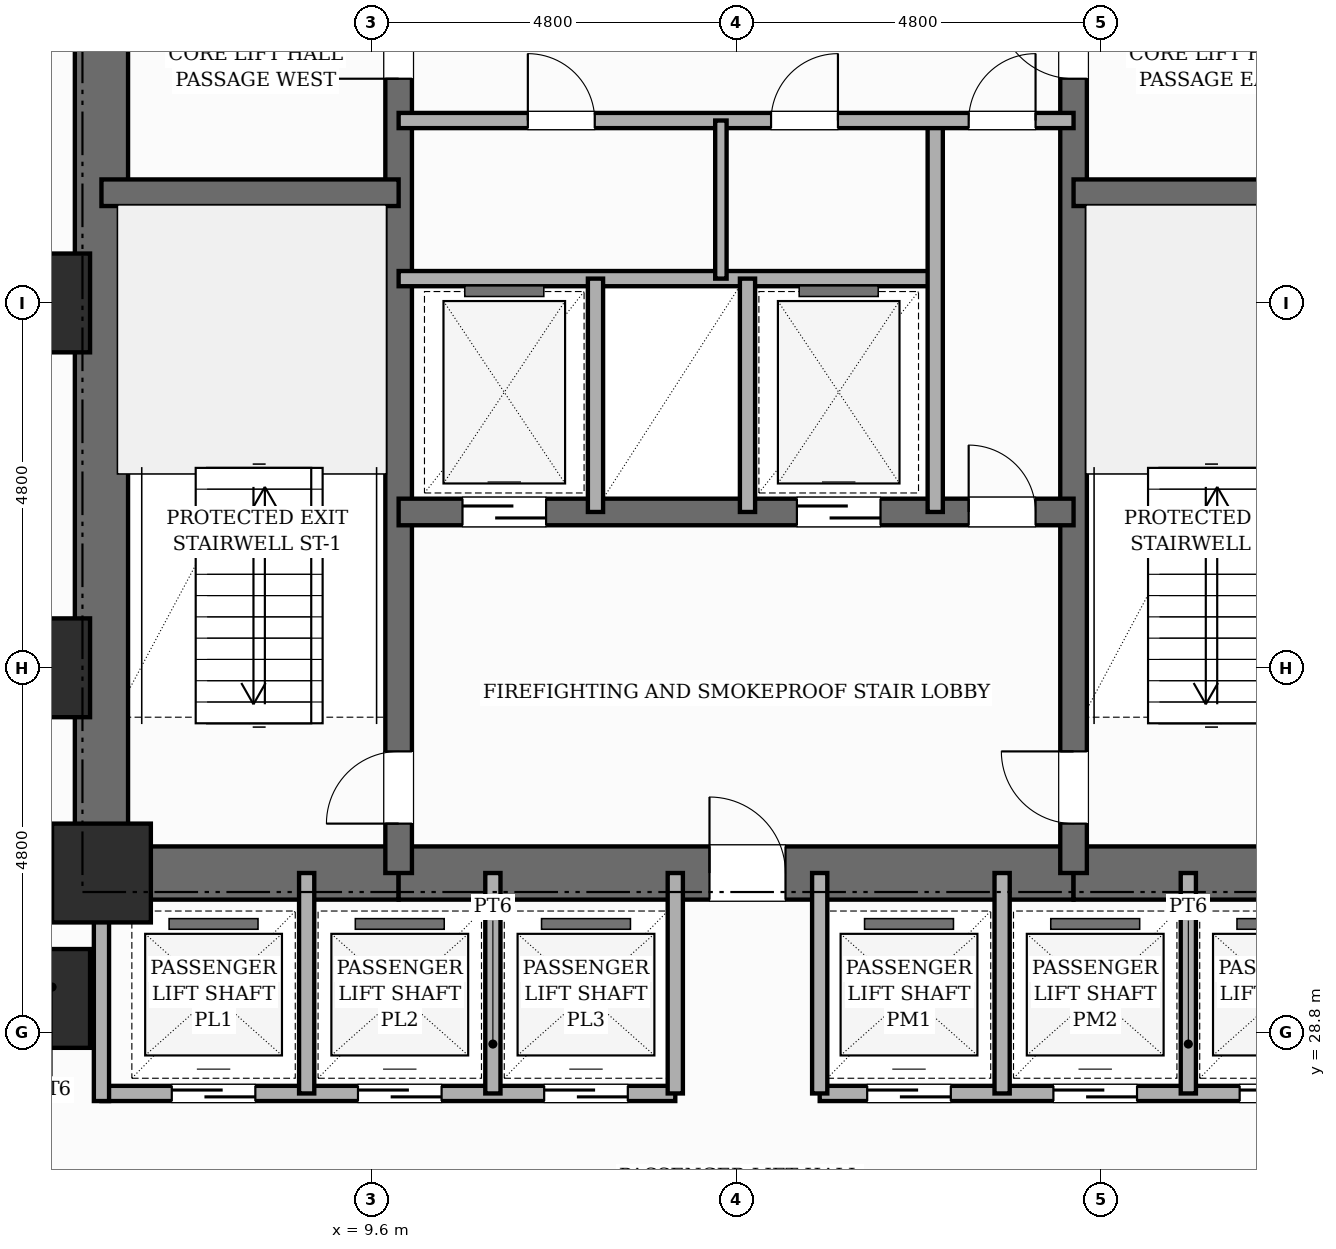
"""IFC4 building model, lengths in metres.
Left out: names, types, materials, properties, quantities, classifications, styles, units other than length and angle.
Written with IfcOpenShell. Run it as: python <this file> out.ifc"""

import sys

from ifc_helpers import new_model, si_unit, direction, frame, frame_2d, origin, origin_2d, place, context, subcontext, project, spatial, rectangle, extrude, element, fill, save


model = new_model("IFC4")
c1 = context("Model", 3, precision=1e-05, world=origin(), true_north=direction((0.0, 1.0)))
c2 = subcontext(c1, "Body", "Model", "MODEL_VIEW")
j1 = project(units=[si_unit("LENGTHUNIT", "METRE"), si_unit("PLANEANGLEUNIT", "RADIAN")], contexts=[c1])
p1 = place(None, origin())
s1 = spatial("IfcSite", under=j1, at=p1, CompositionType="ELEMENT")
p2 = place(p1, origin())
s2 = spatial("IfcBuilding", under=s1, at=p2, CompositionType="ELEMENT")
p3 = place(p2, frame((0.0, 0.0, -4.4)))
s3 = spatial("IfcBuildingStorey", under=s2, at=p3, CompositionType="ELEMENT", Elevation=-4.4)
p4 = place(p3, frame((6.05, 30.55, 0.0), z_axis=(0.0, 0.0, 1.0), x_axis=(0.0, 1.0, 0.0)))
e1 = element("IfcWall", 1, at=p4, inside=s3, PredefinedType="SHEAR", context=c2, shape_type="SweptSolid", body=[
    extrude(rectangle(XDim=15.6, YDim=0.7, at=frame_2d((7.8, 0.0))), origin(), (0.0, 0.0, 1.0), 4.4),
])
p5 = place(p3, frame((6.05, 30.9, 0.0), z_axis=(0.0, 0.0, 1.0), x_axis=(1.0, 0.0, 0.0)))
e2 = element("IfcWall", 2, at=p5, inside=s3, PredefinedType="SHEAR", context=c2, shape_type="SweptSolid", body=[
    extrude(rectangle(XDim=3.91, YDim=0.7, at=frame_2d((1.955, 0.0))), origin(), (0.0, 0.0, 1.0), 4.4),
])
p6 = place(p3, frame((9.96, 30.9, 0.0), z_axis=(0.0, 0.0, 1.0), x_axis=(1.0, 0.0, 0.0)))
e3 = element("IfcWall", 3, at=p6, inside=s3, PredefinedType="SHEAR", context=c2, shape_type="SweptSolid", body=[
    extrude(rectangle(XDim=8.88, YDim=0.7, at=frame_2d((4.44, 0.0))), origin(), (0.0, 0.0, 1.0), 4.4),
])
p7 = place(p6, frame((4.09, 0.0, 0.0)))
e4 = element("IfcOpeningElement", 4, at=p7, cuts=e3, PredefinedType="OPENING", context=c2, shape_type="SweptSolid", body=[
    extrude(rectangle(XDim=1.0, YDim=2.15, at=frame_2d((0.5, 1.075))), frame((0.0, 0.36, 0.0), z_axis=(0.0, -1.0, 0.0), x_axis=(1.0, 0.0, 0.0)), (0.0, 0.0, 1.0), 0.72),
])
p8 = place(p3, frame((18.84, 30.9, 0.0), z_axis=(0.0, 0.0, 1.0), x_axis=(1.0, 0.0, 0.0)))
e5 = element("IfcWall", 5, at=p8, inside=s3, PredefinedType="SHEAR", context=c2, shape_type="SweptSolid", body=[
    extrude(rectangle(XDim=3.91, YDim=0.7, at=frame_2d((1.955, 0.0))), origin(), (0.0, 0.0, 1.0), 4.4),
])
p9 = place(p3, frame((9.96, 30.9, 0.0), z_axis=(0.0, 0.0, 1.0), x_axis=(0.0, 1.0, 0.0)))
e6 = element("IfcWall", 6, at=p9, inside=s3, PredefinedType="SHEAR", context=c2, shape_type="SweptSolid", body=[
    extrude(rectangle(XDim=14.9, YDim=0.35, at=frame_2d((7.45, 0.0))), origin(), (0.0, 0.0, 1.0), 4.4),
])
p10 = place(p9, frame((0.65, 0.0, 0.0)))
e7 = element("IfcOpeningElement", 7, at=p10, cuts=e6, PredefinedType="OPENING", context=c2, shape_type="SweptSolid", body=[
    extrude(rectangle(XDim=0.95, YDim=2.1, at=frame_2d((0.475, 1.05))), frame((0.0, 0.185, 0.0), z_axis=(0.0, -1.0, 0.0), x_axis=(1.0, 0.0, 0.0)), (0.0, 0.0, 1.0), 0.37),
])
p11 = place(p9, frame((10.45, 0.0, 0.0)))
e8 = element("IfcOpeningElement", 8, at=p11, cuts=e6, PredefinedType="OPENING", context=c2, shape_type="SweptSolid", body=[
    extrude(rectangle(XDim=1.0, YDim=2.15, at=frame_2d((0.5, 1.075))), frame((0.0, 0.185, 0.0), z_axis=(0.0, -1.0, 0.0), x_axis=(1.0, 0.0, 0.0)), (0.0, 0.0, 1.0), 0.37),
])
p12 = place(p3, frame((18.84, 30.9, 0.0), z_axis=(0.0, 0.0, 1.0), x_axis=(0.0, 1.0, 0.0)))
e9 = element("IfcWall", 9, at=p12, inside=s3, PredefinedType="SHEAR", context=c2, shape_type="SweptSolid", body=[
    extrude(rectangle(XDim=14.9, YDim=0.35, at=frame_2d((7.45, 0.0))), origin(), (0.0, 0.0, 1.0), 4.4),
])
p13 = place(p12, frame((0.65, 0.0, 0.0)))
e10 = element("IfcOpeningElement", 10, at=p13, cuts=e9, PredefinedType="OPENING", context=c2, shape_type="SweptSolid", body=[
    extrude(rectangle(XDim=0.95, YDim=2.1, at=frame_2d((0.475, 1.05))), frame((0.0, 0.185, 0.0), z_axis=(0.0, -1.0, 0.0), x_axis=(1.0, 0.0, 0.0)), (0.0, 0.0, 1.0), 0.37),
])
p14 = place(p12, frame((10.45, 0.0, 0.0)))
e11 = element("IfcOpeningElement", 11, at=p14, cuts=e9, PredefinedType="OPENING", context=c2, shape_type="SweptSolid", body=[
    extrude(rectangle(XDim=1.0, YDim=2.15, at=frame_2d((0.5, 1.075))), frame((0.0, 0.185, 0.0), z_axis=(0.0, -1.0, 0.0), x_axis=(1.0, 0.0, 0.0)), (0.0, 0.0, 1.0), 0.37),
])
for number, where, z_axis, x_axis in (
    (12, (6.05, 39.85, 0.0), (0.0, 0.0, 1.0), (1.0, 0.0, 0.0)),
    (13, (18.84, 39.85, 0.0), (0.0, 0.0, 1.0), (1.0, 0.0, 0.0)),
):
    element("IfcWall", number, at=place(p3, frame(where, z_axis=z_axis, x_axis=x_axis)), inside=s3, PredefinedType="SHEAR", context=c2, shape_type="SweptSolid", body=[
        extrude(rectangle(XDim=3.91, YDim=0.35, at=frame_2d((1.955, 0.0))), origin(), (0.0, 0.0, 1.0), 4.4),
    ])
p15 = place(p3, frame((9.96, 35.65, 0.0), z_axis=(0.0, 0.0, 1.0), x_axis=(1.0, 0.0, 0.0)))
e14 = element("IfcWall", 14, at=p15, inside=s3, PredefinedType="SHEAR", context=c2, shape_type="SweptSolid", body=[
    extrude(rectangle(XDim=8.88, YDim=0.35, at=frame_2d((4.44, 0.0))), origin(), (0.0, 0.0, 1.0), 4.4),
])
p16 = place(p15, frame((0.84, 0.0, 0.0)))
e15 = element("IfcOpeningElement", 15, at=p16, cuts=e14, PredefinedType="OPENING", context=c2, shape_type="SweptSolid", body=[
    extrude(rectangle(XDim=1.1, YDim=2.15, at=frame_2d((0.55, 1.075))), frame((0.0, 0.185, 0.0), z_axis=(0.0, -1.0, 0.0), x_axis=(1.0, 0.0, 0.0)), (0.0, 0.0, 1.0), 0.37),
])
p17 = place(p15, frame((5.24, 0.0, 0.0)))
e16 = element("IfcOpeningElement", 16, at=p17, cuts=e14, PredefinedType="OPENING", context=c2, shape_type="SweptSolid", body=[
    extrude(rectangle(XDim=1.1, YDim=2.15, at=frame_2d((0.55, 1.075))), frame((0.0, 0.185, 0.0), z_axis=(0.0, -1.0, 0.0), x_axis=(1.0, 0.0, 0.0)), (0.0, 0.0, 1.0), 0.37),
])
p18 = place(p15, frame((7.5, 0.0, 0.0)))
e17 = element("IfcOpeningElement", 17, at=p18, cuts=e14, PredefinedType="OPENING", context=c2, shape_type="SweptSolid", body=[
    extrude(rectangle(XDim=0.88, YDim=2.1, at=frame_2d((0.44, 1.05))), frame((0.0, 0.185, 0.0), z_axis=(0.0, -1.0, 0.0), x_axis=(1.0, 0.0, 0.0)), (0.0, 0.0, 1.0), 0.37),
])
for number, where, z_axis, x_axis in (
    (18, (5.25, 29.25, 0.0), (0.0, 0.0, 1.0), (1.0, 0.0, 0.0)),
    (19, (5.25, 33.6, 0.0), (0.0, 0.0, 1.0), (1.0, 0.0, 0.0)),
    (20, (5.25, 38.4, 0.0), (0.0, 0.0, 1.0), (1.0, 0.0, 0.0)),
    (21, (6.05, 30.9, 0.0), (0.0, 0.0, 1.0), (1.0, 0.0, 0.0)),
):
    element("IfcColumn", number, at=place(p3, frame(where, z_axis=z_axis, x_axis=x_axis)), inside=s3, PredefinedType="COLUMN", context=c2, shape_type="SweptSolid", body=[
        extrude(rectangle(XDim=1.3, YDim=1.3, at=origin_2d()), origin(), (0.0, 0.0, 1.0), 4.4),
    ])
p19 = place(p3, frame((9.96, 38.72, 0.0), z_axis=(0.0, 0.0, 1.0), x_axis=(1.0, 0.0, 0.0)))
e22 = element("IfcWall", 22, at=p19, inside=s3, PredefinedType="POLYGONAL", context=c2, shape_type="SweptSolid", body=[
    extrude(rectangle(XDim=7.06, YDim=0.2, at=frame_2d((3.53, 0.0))), origin(), (0.0, 0.0, 1.0), 4.05),
])
for number, where, z_axis, x_axis in (
    (23, (12.55, 35.65, 0.0), (0.0, 0.0, 1.0), (0.0, 1.0, 0.0)),
    (24, (14.55, 35.65, 0.0), (0.0, 0.0, 1.0), (0.0, 1.0, 0.0)),
):
    element("IfcWall", number, at=place(p3, frame(where, z_axis=z_axis, x_axis=x_axis)), inside=s3, PredefinedType="POLYGONAL", context=c2, shape_type="SweptSolid", body=[
        extrude(rectangle(XDim=3.07, YDim=0.2, at=frame_2d((1.535, 0.0))), origin(), (0.0, 0.0, 1.0), 4.05),
    ])
p20 = place(p3, frame((17.02, 35.65, 0.0), z_axis=(0.0, 0.0, 1.0), x_axis=(0.0, 1.0, 0.0)))
e25 = element("IfcWall", 25, at=p20, inside=s3, PredefinedType="POLYGONAL", context=c2, shape_type="SweptSolid", body=[
    extrude(rectangle(XDim=5.15, YDim=0.2, at=frame_2d((2.575, 0.0))), origin(), (0.0, 0.0, 1.0), 4.05),
])
p21 = place(p3, frame((9.96, 40.8, 0.0), z_axis=(0.0, 0.0, 1.0), x_axis=(1.0, 0.0, 0.0)))
e26 = element("IfcWall", 26, at=p21, inside=s3, PredefinedType="POLYGONAL", context=c2, shape_type="SweptSolid", body=[
    extrude(rectangle(XDim=8.88, YDim=0.2, at=frame_2d((4.44, 0.0))), origin(), (0.0, 0.0, 1.0), 4.05),
])
p22 = place(p21, frame((7.5, 0.0, 0.0)))
e27 = element("IfcOpeningElement", 27, at=p22, cuts=e26, PredefinedType="OPENING", context=c2, shape_type="SweptSolid", body=[
    extrude(rectangle(XDim=0.88, YDim=2.1, at=frame_2d((0.44, 1.05))), frame((0.0, 0.11, 0.0), z_axis=(0.0, -1.0, 0.0), x_axis=(1.0, 0.0, 0.0)), (0.0, 0.0, 1.0), 0.22),
])
p23 = place(p21, frame((1.7, 0.0, 0.0)))
e28 = element("IfcOpeningElement", 28, at=p23, cuts=e26, PredefinedType="OPENING", context=c2, shape_type="SweptSolid", body=[
    extrude(rectangle(XDim=0.88, YDim=2.1, at=frame_2d((0.44, 1.05))), frame((0.0, 0.11, 0.0), z_axis=(0.0, -1.0, 0.0), x_axis=(1.0, 0.0, 0.0)), (0.0, 0.0, 1.0), 0.22),
])
p24 = place(p21, frame((4.9, 0.0, 0.0)))
e29 = element("IfcOpeningElement", 29, at=p24, cuts=e26, PredefinedType="OPENING", context=c2, shape_type="SweptSolid", body=[
    extrude(rectangle(XDim=0.88, YDim=2.1, at=frame_2d((0.44, 1.05))), frame((0.0, 0.11, 0.0), z_axis=(0.0, -1.0, 0.0), x_axis=(1.0, 0.0, 0.0)), (0.0, 0.0, 1.0), 0.22),
])
p25 = place(p3, frame((14.2, 38.72, 0.0), z_axis=(0.0, 0.0, 1.0), x_axis=(0.0, 1.0, 0.0)))
e30 = element("IfcWall", 30, at=p25, inside=s3, PredefinedType="PARTITIONING", context=c2, shape_type="SweptSolid", body=[
    extrude(rectangle(XDim=2.08, YDim=0.15, at=frame_2d((1.04, 0.0))), origin(), (0.0, 0.0, 1.0), 4.05),
])
p26 = place(p3, frame((6.05, 28.0, 0.0), z_axis=(0.0, 0.0, 1.0), x_axis=(1.0, 0.0, 0.0)))
e31 = element("IfcWall", 31, at=p26, inside=s3, PredefinedType="POLYGONAL", context=c2, shape_type="SweptSolid", body=[
    extrude(rectangle(XDim=7.55, YDim=0.2, at=frame_2d((3.775, 0.0))), origin(), (0.0, 0.0, 1.0), 4.05),
])
p27 = place(p26, frame((0.925, 0.0, 0.0)))
e32 = element("IfcOpeningElement", 32, at=p27, cuts=e31, PredefinedType="OPENING", context=c2, shape_type="SweptSolid", body=[
    extrude(rectangle(XDim=1.1, YDim=2.15, at=frame_2d((0.55, 1.075))), frame((0.0, 0.11, 0.0), z_axis=(0.0, -1.0, 0.0), x_axis=(1.0, 0.0, 0.0)), (0.0, 0.0, 1.0), 0.22),
])
p28 = place(p26, frame((3.375, 0.0, 0.0)))
e33 = element("IfcOpeningElement", 33, at=p28, cuts=e31, PredefinedType="OPENING", context=c2, shape_type="SweptSolid", body=[
    extrude(rectangle(XDim=1.1, YDim=2.15, at=frame_2d((0.55, 1.075))), frame((0.0, 0.11, 0.0), z_axis=(0.0, -1.0, 0.0), x_axis=(1.0, 0.0, 0.0)), (0.0, 0.0, 1.0), 0.22),
])
p29 = place(p26, frame((5.825, 0.0, 0.0)))
e34 = element("IfcOpeningElement", 34, at=p29, cuts=e31, PredefinedType="OPENING", context=c2, shape_type="SweptSolid", body=[
    extrude(rectangle(XDim=1.1, YDim=2.15, at=frame_2d((0.55, 1.075))), frame((0.0, 0.11, 0.0), z_axis=(0.0, -1.0, 0.0), x_axis=(1.0, 0.0, 0.0)), (0.0, 0.0, 1.0), 0.22),
])
p30 = place(p3, frame((15.5, 28.0, 0.0), z_axis=(0.0, 0.0, 1.0), x_axis=(1.0, 0.0, 0.0)))
e35 = element("IfcWall", 35, at=p30, inside=s3, PredefinedType="POLYGONAL", context=c2, shape_type="SweptSolid", body=[
    extrude(rectangle(XDim=7.25, YDim=0.2, at=frame_2d((3.625, 0.0))), origin(), (0.0, 0.0, 1.0), 4.05),
])
p31 = place(p30, frame((0.625, 0.0, 0.0)))
e36 = element("IfcOpeningElement", 36, at=p31, cuts=e35, PredefinedType="OPENING", context=c2, shape_type="SweptSolid", body=[
    extrude(rectangle(XDim=1.1, YDim=2.15, at=frame_2d((0.55, 1.075))), frame((0.0, 0.11, 0.0), z_axis=(0.0, -1.0, 0.0), x_axis=(1.0, 0.0, 0.0)), (0.0, 0.0, 1.0), 0.22),
])
p32 = place(p30, frame((3.075, 0.0, 0.0)))
e37 = element("IfcOpeningElement", 37, at=p32, cuts=e35, PredefinedType="OPENING", context=c2, shape_type="SweptSolid", body=[
    extrude(rectangle(XDim=1.1, YDim=2.15, at=frame_2d((0.55, 1.075))), frame((0.0, 0.11, 0.0), z_axis=(0.0, -1.0, 0.0), x_axis=(1.0, 0.0, 0.0)), (0.0, 0.0, 1.0), 0.22),
])
p33 = place(p30, frame((5.525, 0.0, 0.0)))
e38 = element("IfcOpeningElement", 38, at=p33, cuts=e35, PredefinedType="OPENING", context=c2, shape_type="SweptSolid", body=[
    extrude(rectangle(XDim=1.1, YDim=2.15, at=frame_2d((0.55, 1.075))), frame((0.0, 0.11, 0.0), z_axis=(0.0, -1.0, 0.0), x_axis=(1.0, 0.0, 0.0)), (0.0, 0.0, 1.0), 0.22),
])
p34 = place(p3, frame((6.05, 27.9, 0.0), z_axis=(0.0, 0.0, 1.0), x_axis=(0.0, 1.0, 0.0)))
e39 = element("IfcWall", 39, at=p34, inside=s3, PredefinedType="POLYGONAL", context=c2, shape_type="SweptSolid", body=[
    extrude(rectangle(XDim=3.0, YDim=0.2, at=frame_2d((1.5, 0.0))), origin(), (0.0, 0.0, 1.0), 4.05),
])
for number, where, z_axis, x_axis in (
    (40, (13.6, 28.0, 0.0), (0.0, 0.0, 1.0), (0.0, 1.0, 0.0)),
    (41, (15.5, 28.0, 0.0), (0.0, 0.0, 1.0), (0.0, 1.0, 0.0)),
    (42, (8.75, 28.0, 0.0), (0.0, 0.0, 1.0), (0.0, 1.0, 0.0)),
    (43, (11.2, 28.0, 0.0), (0.0, 0.0, 1.0), (0.0, 1.0, 0.0)),
    (44, (17.9, 28.0, 0.0), (0.0, 0.0, 1.0), (0.0, 1.0, 0.0)),
    (45, (20.35, 28.0, 0.0), (0.0, 0.0, 1.0), (0.0, 1.0, 0.0)),
):
    element("IfcWall", number, at=place(p3, frame(where, z_axis=z_axis, x_axis=x_axis)), inside=s3, PredefinedType="POLYGONAL", context=c2, shape_type="SweptSolid", body=[
        extrude(rectangle(XDim=2.9, YDim=0.2, at=frame_2d((1.45, 0.0))), origin(), (0.0, 0.0, 1.0), 4.05),
    ])
p35 = place(p10, origin())
e46 = element("IfcDoor", 46, at=p35, inside=s3, OperationType="SINGLE_SWING_LEFT", PredefinedType="DOOR", context=c2, shape_type="SweptSolid", body=[
    extrude(rectangle(XDim=0.95, YDim=2.1, at=frame_2d((0.475, 1.05))), frame((0.0, 0.025, 0.0), z_axis=(0.0, -1.0, 0.0), x_axis=(1.0, 0.0, 0.0)), (0.0, 0.0, 1.0), 0.05),
])
fill(e7, e46)
p36 = place(p13, origin())
e47 = element("IfcDoor", 47, at=p36, inside=s3, OperationType="SINGLE_SWING_RIGHT", PredefinedType="DOOR", context=c2, shape_type="SweptSolid", body=[
    extrude(rectangle(XDim=0.95, YDim=2.1, at=frame_2d((0.475, 1.05))), frame((0.0, 0.025, 0.0), z_axis=(0.0, -1.0, 0.0), x_axis=(1.0, 0.0, 0.0)), (0.0, 0.0, 1.0), 0.05),
])
fill(e10, e47)
p37 = place(p7, origin())
e48 = element("IfcDoor", 48, at=p37, inside=s3, OperationType="SINGLE_SWING_LEFT", PredefinedType="DOOR", context=c2, shape_type="SweptSolid", body=[
    extrude(rectangle(XDim=1.0, YDim=2.15, at=frame_2d((0.5, 1.075))), frame((0.0, 0.025, 0.0), z_axis=(0.0, -1.0, 0.0), x_axis=(1.0, 0.0, 0.0)), (0.0, 0.0, 1.0), 0.05),
])
fill(e4, e48)
p38 = place(p16, origin())
e49 = element("IfcDoor", 49, at=p38, inside=s3, OperationType="SLIDING_TO_LEFT", PredefinedType="DOOR", context=c2, shape_type="SweptSolid", body=[
    extrude(rectangle(XDim=1.1, YDim=2.15, at=frame_2d((0.55, 1.075))), frame((0.0, 0.025, 0.0), z_axis=(0.0, -1.0, 0.0), x_axis=(1.0, 0.0, 0.0)), (0.0, 0.0, 1.0), 0.05),
])
fill(e15, e49)
p39 = place(p17, origin())
e50 = element("IfcDoor", 50, at=p39, inside=s3, OperationType="SLIDING_TO_RIGHT", PredefinedType="DOOR", context=c2, shape_type="SweptSolid", body=[
    extrude(rectangle(XDim=1.1, YDim=2.15, at=frame_2d((0.55, 1.075))), frame((0.0, 0.025, 0.0), z_axis=(0.0, -1.0, 0.0), x_axis=(1.0, 0.0, 0.0)), (0.0, 0.0, 1.0), 0.05),
])
fill(e16, e50)
p40 = place(p18, origin())
e51 = element("IfcDoor", 51, at=p40, inside=s3, OperationType="SINGLE_SWING_LEFT", PredefinedType="DOOR", context=c2, shape_type="SweptSolid", body=[
    extrude(rectangle(XDim=0.88, YDim=2.1, at=frame_2d((0.44, 1.05))), frame((0.0, 0.025, 0.0), z_axis=(0.0, -1.0, 0.0), x_axis=(1.0, 0.0, 0.0)), (0.0, 0.0, 1.0), 0.05),
])
fill(e17, e51)
p41 = place(p22, origin())
e52 = element("IfcDoor", 52, at=p41, inside=s3, OperationType="SINGLE_SWING_RIGHT", PredefinedType="DOOR", context=c2, shape_type="SweptSolid", body=[
    extrude(rectangle(XDim=0.88, YDim=2.1, at=frame_2d((0.44, 1.05))), frame((0.0, 0.025, 0.0), z_axis=(0.0, -1.0, 0.0), x_axis=(1.0, 0.0, 0.0)), (0.0, 0.0, 1.0), 0.05),
])
fill(e27, e52)
p42 = place(p11, origin())
e53 = element("IfcDoor", 53, at=p42, inside=s3, OperationType="SINGLE_SWING_LEFT", PredefinedType="DOOR", context=c2, shape_type="SweptSolid", body=[
    extrude(rectangle(XDim=1.0, YDim=2.15, at=frame_2d((0.5, 1.075))), frame((0.0, 0.025, 0.0), z_axis=(0.0, -1.0, 0.0), x_axis=(1.0, 0.0, 0.0)), (0.0, 0.0, 1.0), 0.05),
])
fill(e8, e53)
p43 = place(p14, origin())
e54 = element("IfcDoor", 54, at=p43, inside=s3, OperationType="SINGLE_SWING_RIGHT", PredefinedType="DOOR", context=c2, shape_type="SweptSolid", body=[
    extrude(rectangle(XDim=1.0, YDim=2.15, at=frame_2d((0.5, 1.075))), frame((0.0, 0.025, 0.0), z_axis=(0.0, -1.0, 0.0), x_axis=(1.0, 0.0, 0.0)), (0.0, 0.0, 1.0), 0.05),
])
fill(e11, e54)
p44 = place(p23, origin())
e55 = element("IfcDoor", 55, at=p44, inside=s3, OperationType="SINGLE_SWING_LEFT", PredefinedType="DOOR", context=c2, shape_type="SweptSolid", body=[
    extrude(rectangle(XDim=0.88, YDim=2.1, at=frame_2d((0.44, 1.05))), frame((0.0, 0.025, 0.0), z_axis=(0.0, -1.0, 0.0), x_axis=(1.0, 0.0, 0.0)), (0.0, 0.0, 1.0), 0.05),
])
fill(e28, e55)
p45 = place(p24, origin())
e56 = element("IfcDoor", 56, at=p45, inside=s3, OperationType="SINGLE_SWING_RIGHT", PredefinedType="DOOR", context=c2, shape_type="SweptSolid", body=[
    extrude(rectangle(XDim=0.88, YDim=2.1, at=frame_2d((0.44, 1.05))), frame((0.0, 0.025, 0.0), z_axis=(0.0, -1.0, 0.0), x_axis=(1.0, 0.0, 0.0)), (0.0, 0.0, 1.0), 0.05),
])
fill(e29, e56)
p46 = place(p27, origin())
e57 = element("IfcDoor", 57, at=p46, inside=s3, OperationType="SLIDING_TO_LEFT", PredefinedType="DOOR", context=c2, shape_type="SweptSolid", body=[
    extrude(rectangle(XDim=1.1, YDim=2.15, at=frame_2d((0.55, 1.075))), frame((0.0, 0.025, 0.0), z_axis=(0.0, -1.0, 0.0), x_axis=(1.0, 0.0, 0.0)), (0.0, 0.0, 1.0), 0.05),
])
fill(e32, e57)
p47 = place(p28, origin())
e58 = element("IfcDoor", 58, at=p47, inside=s3, OperationType="SLIDING_TO_RIGHT", PredefinedType="DOOR", context=c2, shape_type="SweptSolid", body=[
    extrude(rectangle(XDim=1.1, YDim=2.15, at=frame_2d((0.55, 1.075))), frame((0.0, 0.025, 0.0), z_axis=(0.0, -1.0, 0.0), x_axis=(1.0, 0.0, 0.0)), (0.0, 0.0, 1.0), 0.05),
])
fill(e33, e58)
p48 = place(p29, origin())
e59 = element("IfcDoor", 59, at=p48, inside=s3, OperationType="SLIDING_TO_LEFT", PredefinedType="DOOR", context=c2, shape_type="SweptSolid", body=[
    extrude(rectangle(XDim=1.1, YDim=2.15, at=frame_2d((0.55, 1.075))), frame((0.0, 0.025, 0.0), z_axis=(0.0, -1.0, 0.0), x_axis=(1.0, 0.0, 0.0)), (0.0, 0.0, 1.0), 0.05),
])
fill(e34, e59)
p49 = place(p31, origin())
e60 = element("IfcDoor", 60, at=p49, inside=s3, OperationType="SLIDING_TO_RIGHT", PredefinedType="DOOR", context=c2, shape_type="SweptSolid", body=[
    extrude(rectangle(XDim=1.1, YDim=2.15, at=frame_2d((0.55, 1.075))), frame((0.0, 0.025, 0.0), z_axis=(0.0, -1.0, 0.0), x_axis=(1.0, 0.0, 0.0)), (0.0, 0.0, 1.0), 0.05),
])
fill(e36, e60)
p50 = place(p32, origin())
e61 = element("IfcDoor", 61, at=p50, inside=s3, OperationType="SLIDING_TO_LEFT", PredefinedType="DOOR", context=c2, shape_type="SweptSolid", body=[
    extrude(rectangle(XDim=1.1, YDim=2.15, at=frame_2d((0.55, 1.075))), frame((0.0, 0.025, 0.0), z_axis=(0.0, -1.0, 0.0), x_axis=(1.0, 0.0, 0.0)), (0.0, 0.0, 1.0), 0.05),
])
fill(e37, e61)
p51 = place(p33, origin())
e62 = element("IfcDoor", 62, at=p51, inside=s3, OperationType="SLIDING_TO_RIGHT", PredefinedType="DOOR", context=c2, shape_type="SweptSolid", body=[
    extrude(rectangle(XDim=1.1, YDim=2.15, at=frame_2d((0.55, 1.075))), frame((0.0, 0.025, 0.0), z_axis=(0.0, -1.0, 0.0), x_axis=(1.0, 0.0, 0.0)), (0.0, 0.0, 1.0), 0.05),
])
fill(e38, e62)
save(model, sys.argv[1])
